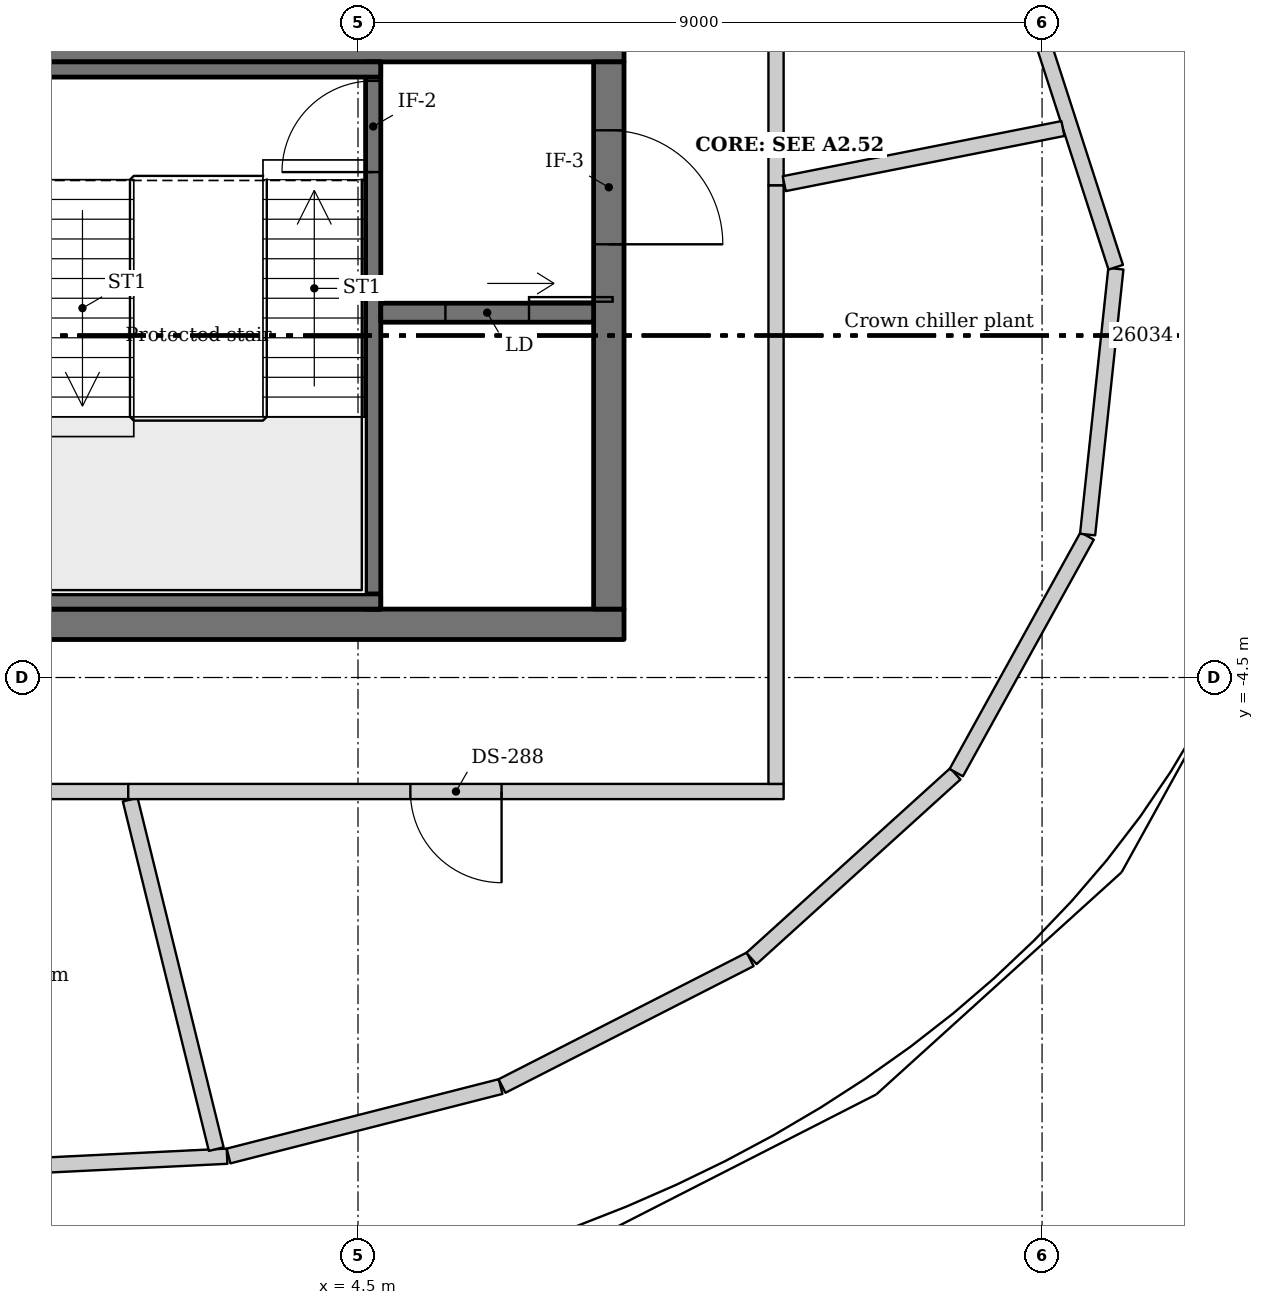
"""IFC4 building model, lengths in metres.
Left out: names, types, materials, properties, quantities, classifications, styles, units other than length and angle.
Written with IfcOpenShell. Run it as: python <this file> out.ifc"""

import sys

from ifc_helpers import new_model, si_unit, direction, frame, frame_2d, origin, place, context, subcontext, project, spatial, rectangle, extrude, source, transform, mapped, element, fill, save


model = new_model("IFC4")
c1 = context("Model", 3, precision=1e-05, world=origin(), true_north=direction((0.0, 1.0)))
c2 = subcontext(c1, "Body", "Model", "MODEL_VIEW")
j1 = project(units=[si_unit("LENGTHUNIT", "METRE"), si_unit("PLANEANGLEUNIT", "RADIAN")], contexts=[c1])
p1 = place(None, origin())
s1 = spatial("IfcSite", under=j1, at=p1, CompositionType="ELEMENT")
p2 = place(p1, origin())
s2 = spatial("IfcBuilding", under=s1, at=p2, CompositionType="ELEMENT")
p3 = place(p2, frame((0.0, 0.0, 361.0)))
s3 = spatial("IfcBuildingStorey", under=s2, at=p3, CompositionType="ELEMENT", Elevation=361.0)
m1 = source(origin(), c2, "Body", "SweptSolid", [
    extrude(rectangle(XDim=16.0, YDim=0.4, at=frame_2d((8.0, 0.0))), origin(), (0.0, 0.0, 1.0), 4.5),
])
for number, where, z_axis, x_axis in (
    (1, (-8.0, 3.8, -0.25), (0.0, 0.0, 1.0), (1.0, 0.0, 0.0)),
    (2, (-8.0, -3.8, -0.25), (0.0, 0.0, 1.0), (1.0, 0.0, 0.0)),
):
    element("IfcWall", number, at=place(p3, frame(where, z_axis=z_axis, x_axis=x_axis)), inside=s3, PredefinedType="SHEAR", context=c2, shape_type="MappedRepresentation", body=[
        mapped(m1, transform((0.0, 0.0, 0.0))),
    ])
m2 = source(origin(), c2, "Body", "SweptSolid", [
    extrude(rectangle(XDim=7.2, YDim=0.4, at=frame_2d((3.6, 0.0))), origin(), (0.0, 0.0, 1.0), 4.5),
])
p4 = place(p3, frame((7.8, -3.6, -0.25), z_axis=(0.0, 0.0, 1.0), x_axis=(0.0, 1.0, 0.0)))
e3 = element("IfcWall", 3, at=p4, inside=s3, PredefinedType="SHEAR", context=c2, shape_type="MappedRepresentation", body=[
    mapped(m2, transform((0.0, 0.0, 0.0))),
])
m3 = source(origin(), c2, "Body", "SweptSolid", [
    extrude(rectangle(XDim=1.5, YDim=2.1, at=frame_2d((0.75, 1.05))), frame((0.0, 0.21, 0.0), z_axis=(0.0, -1.0, 0.0), x_axis=(1.0, 0.0, 0.0)), (0.0, 0.0, 1.0), 0.42),
])
p5 = place(p4, frame((4.8, 0.0, 0.25)))
e4 = element("IfcOpeningElement", 4, at=p5, cuts=e3, PredefinedType="OPENING", context=c2, shape_type="MappedRepresentation", body=[
    mapped(m3, transform((0.0, 0.0, 0.0))),
])
m4 = source(origin(), c2, "Body", "SweptSolid", [
    extrude(rectangle(XDim=3.704, YDim=0.2, at=frame_2d((1.852, 0.0))), origin(), (0.0, 0.0, 1.0), 4.25),
])
p6 = place(p3, frame((2.777, -10.799, 0.0), z_axis=(0.0, 0.0, 1.0), x_axis=(-0.998800036237, -0.04897435669, 0.0)))
e5 = element("IfcWall", 5, at=p6, inside=s3, PredefinedType="SOLIDWALL", context=c2, shape_type="MappedRepresentation", body=[
    mapped(m4, transform((0.0, 0.0, 0.0))),
])
m5 = source(origin(), c2, "Body", "SweptSolid", [
    extrude(rectangle(XDim=3.694, YDim=0.2, at=frame_2d((1.847, 0.0))), origin(), (0.0, 0.0, 1.0), 4.25),
])
p7 = place(p3, frame((6.376, -9.882, 0.0), z_axis=(0.0, 0.0, 1.0), x_axis=(-0.968929170675, -0.247338355731, 0.0)))
e6 = element("IfcWall", 6, at=p7, inside=s3, PredefinedType="SOLIDWALL", context=c2, shape_type="MappedRepresentation", body=[
    mapped(m5, transform((0.0, 0.0, 0.0))),
])
m6 = source(origin(), c2, "Body", "SweptSolid", [
    extrude(rectangle(XDim=3.666, YDim=0.2, at=frame_2d((1.833, 0.0))), origin(), (0.0, 0.0, 1.0), 4.25),
])
p8 = place(p3, frame((9.66, -8.208, 0.0), z_axis=(0.0, 0.0, 1.0), x_axis=(-0.89069419258, -0.454602964469, 0.0)))
e7 = element("IfcWall", 7, at=p8, inside=s3, PredefinedType="SOLIDWALL", context=c2, shape_type="MappedRepresentation", body=[
    mapped(m6, transform((0.0, 0.0, 0.0))),
])
m7 = source(origin(), c2, "Body", "SweptSolid", [
    extrude(rectangle(XDim=3.619, YDim=0.2, at=frame_2d((1.81, 0.0))), origin(), (0.0, 0.0, 1.0), 4.25),
])
p9 = place(p3, frame((12.359, -5.767, 0.0), z_axis=(0.0, 0.0, 1.0), x_axis=(-0.741120145492, -0.671372422688, 0.0)))
e8 = element("IfcWall", 8, at=p9, inside=s3, PredefinedType="SOLIDWALL", context=c2, shape_type="MappedRepresentation", body=[
    mapped(m7, transform((0.0, 0.0, 0.0))),
])
m8 = source(origin(), c2, "Body", "SweptSolid", [
    extrude(rectangle(XDim=3.559, YDim=0.2, at=frame_2d((1.779, 0.0))), origin(), (0.0, 0.0, 1.0), 4.25),
])
p10 = place(p3, frame((14.093, -2.638, 0.0), z_axis=(0.0, 0.0, 1.0), x_axis=(-0.483958553542, -0.875090920107, 0.0)))
e9 = element("IfcWall", 9, at=p10, inside=s3, PredefinedType="SOLIDWALL", context=c2, shape_type="MappedRepresentation", body=[
    mapped(m8, transform((0.0, 0.0, 0.0))),
])
m9 = source(origin(), c2, "Body", "SweptSolid", [
    extrude(rectangle(XDim=3.518, YDim=0.2, at=frame_2d((1.759, 0.0))), origin(), (0.0, 0.0, 1.0), 4.25),
])
p11 = place(p3, frame((14.471, 0.879, 0.0), z_axis=(0.0, 0.0, 1.0), x_axis=(-0.105775833098, -0.994390000519, 0.0)))
e10 = element("IfcWall", 10, at=p11, inside=s3, PredefinedType="SOLIDWALL", context=c2, shape_type="MappedRepresentation", body=[
    mapped(m9, transform((0.0, 0.0, 0.0))),
])
m10 = source(origin(), c2, "Body", "SweptSolid", [
    extrude(rectangle(XDim=3.532, YDim=0.2, at=frame_2d((1.766, 0.0))), origin(), (0.0, 0.0, 1.0), 4.25),
])
p12 = place(p3, frame((13.383, 4.26, 0.0), z_axis=(0.0, 0.0, 1.0), x_axis=(0.307547938379, -0.951532587776, 0.0)))
e11 = element("IfcWall", 11, at=p12, inside=s3, PredefinedType="SOLIDWALL", context=c2, shape_type="MappedRepresentation", body=[
    mapped(m10, transform((0.0, 0.0, 0.0))),
])
m11 = source(origin(), c2, "Body", "SweptSolid", [
    extrude(rectangle(XDim=7.2, YDim=0.2, at=frame_2d((3.6, 0.0))), origin(), (0.0, 0.0, 1.0), 4.25),
])
p13 = place(p3, frame((4.7, -3.6, 0.0), z_axis=(0.0, 0.0, 1.0), x_axis=(0.0, 1.0, 0.0)))
e12 = element("IfcWall", 12, at=p13, inside=s3, PredefinedType="SHEAR", context=c2, shape_type="MappedRepresentation", body=[
    mapped(m11, transform((0.0, 0.0, 0.0))),
])
m12 = source(origin(), c2, "Body", "SweptSolid", [
    extrude(rectangle(XDim=1.2, YDim=2.1, at=frame_2d((0.6, 1.05))), frame((0.0, 0.11, 0.0), z_axis=(0.0, -1.0, 0.0), x_axis=(1.0, 0.0, 0.0)), (0.0, 0.0, 1.0), 0.22),
])
p14 = place(p13, frame((5.75, 0.0, 0.0)))
e13 = element("IfcOpeningElement", 13, at=p14, cuts=e12, PredefinedType="OPENING", context=c2, shape_type="MappedRepresentation", body=[
    mapped(m12, transform((0.0, 0.0, 0.0))),
])
m13 = source(origin(), c2, "Body", "SweptSolid", [
    extrude(rectangle(XDim=2.8, YDim=0.25, at=frame_2d((1.4, 0.0))), origin(), (0.0, 0.0, 1.0), 4.25),
])
p15 = place(p3, frame((7.6, 0.3, 0.0), z_axis=(0.0, 0.0, 1.0), x_axis=(-1.0, 0.0, 0.0)))
e14 = element("IfcWall", 14, at=p15, inside=s3, PredefinedType="SHEAR", context=c2, shape_type="MappedRepresentation", body=[
    mapped(m13, transform((0.0, 0.0, 0.0))),
])
m14 = source(origin(), c2, "Body", "SweptSolid", [
    extrude(rectangle(XDim=1.1, YDim=2.1, at=frame_2d((0.55, 1.05))), frame((0.0, 0.135, 0.0), z_axis=(0.0, -1.0, 0.0), x_axis=(1.0, 0.0, 0.0)), (0.0, 0.0, 1.0), 0.27),
])
p16 = place(p15, frame((0.85, 0.0, 0.0)))
e15 = element("IfcOpeningElement", 15, at=p16, cuts=e14, PredefinedType="OPENING", context=c2, shape_type="MappedRepresentation", body=[
    mapped(m14, transform((0.0, 0.0, 0.0))),
])
m15 = source(origin(), c2, "Body", "SweptSolid", [
    extrude(rectangle(XDim=9.596, YDim=0.2, at=frame_2d((4.798, 0.0))), origin(), (0.0, 0.0, 1.0), 4.25),
])
for number, where, z_axis, x_axis in (
    (16, (-4.798, -3.5, 0.0), (0.0, 0.0, 1.0), (1.0, 0.0, 0.0)),
    (17, (4.798, 3.5, 0.0), (0.0, 0.0, 1.0), (-1.0, 0.0, 0.0)),
):
    element("IfcWall", number, at=place(p3, frame(where, z_axis=z_axis, x_axis=x_axis)), inside=s3, PredefinedType="SHEAR", context=c2, shape_type="MappedRepresentation", body=[
        mapped(m15, transform((0.0, 0.0, 0.0))),
    ])
m16 = source(origin(), c2, "Body", "SweptSolid", [
    extrude(rectangle(XDim=11.577, YDim=0.2, at=frame_2d((5.789, 0.0))), origin(), (0.0, 0.0, 1.0), 4.25),
])
p17 = place(p3, frame((1.477, -6.0, 0.0), z_axis=(0.0, 0.0, 1.0), x_axis=(-1.0, 0.0, 0.0)))
e18 = element("IfcWall", 18, at=p17, inside=s3, PredefinedType="PARTITIONING", context=c2, shape_type="MappedRepresentation", body=[
    mapped(m16, transform((0.0, 0.0, 0.0))),
])
p18 = place(p17, frame((5.189, 0.0, 0.0)))
e19 = element("IfcOpeningElement", 19, at=p18, cuts=e18, PredefinedType="OPENING", context=c2, shape_type="MappedRepresentation", body=[
    mapped(m12, transform((0.0, 0.0, 0.0))),
])
m17 = source(origin(), c2, "Body", "SweptSolid", [
    extrude(rectangle(XDim=4.735, YDim=0.2, at=frame_2d((2.368, 0.0))), origin(), (0.0, 0.0, 1.0), 4.25),
])
p19 = place(p3, frame((1.503, -6.107, 0.0), z_axis=(0.0, 0.0, 1.0), x_axis=(0.239064665941, -0.971003648551, 0.0)))
e20 = element("IfcWall", 20, at=p19, inside=s3, PredefinedType="PARTITIONING", context=c2, shape_type="MappedRepresentation", body=[
    mapped(m17, transform((0.0, 0.0, 0.0))),
])
m18 = source(origin(), c2, "Body", "SweptSolid", [
    extrude(rectangle(XDim=8.623, YDim=0.2, at=frame_2d((4.312, 0.0))), origin(), (0.0, 0.0, 1.0), 4.25),
])
p20 = place(p3, frame((10.1, -6.0, 0.0), z_axis=(0.0, 0.0, 1.0), x_axis=(-1.0, 0.0, 0.0)))
e21 = element("IfcWall", 21, at=p20, inside=s3, PredefinedType="PARTITIONING", context=c2, shape_type="MappedRepresentation", body=[
    mapped(m18, transform((0.0, 0.0, 0.0))),
])
p21 = place(p20, frame((3.711, 0.0, 0.0)))
e22 = element("IfcOpeningElement", 22, at=p21, cuts=e21, PredefinedType="OPENING", context=c2, shape_type="MappedRepresentation", body=[
    mapped(m12, transform((0.0, 0.0, 0.0))),
])
m19 = source(origin(), c2, "Body", "SweptSolid", [
    extrude(rectangle(XDim=7.877, YDim=0.2, at=frame_2d((3.938, 0.0))), origin(), (0.0, 0.0, 1.0), 4.25),
])
p22 = place(p3, frame((10.0, 1.977, 0.0), z_axis=(0.0, 0.0, 1.0), x_axis=(0.0, -1.0, 0.0)))
e23 = element("IfcWall", 23, at=p22, inside=s3, PredefinedType="PARTITIONING", context=c2, shape_type="MappedRepresentation", body=[
    mapped(m19, transform((0.0, 0.0, 0.0))),
])
m20 = source(origin(), c2, "Body", "SweptSolid", [
    extrude(rectangle(XDim=3.923, YDim=0.2, at=frame_2d((1.961, 0.0))), origin(), (0.0, 0.0, 1.0), 4.25),
])
p23 = place(p3, frame((10.0, 5.9, 0.0), z_axis=(0.0, 0.0, 1.0), x_axis=(0.0, -1.0, 0.0)))
e24 = element("IfcWall", 24, at=p23, inside=s3, PredefinedType="PARTITIONING", context=c2, shape_type="MappedRepresentation", body=[
    mapped(m20, transform((0.0, 0.0, 0.0))),
])
m21 = source(origin(), c2, "Body", "SweptSolid", [
    extrude(rectangle(XDim=3.737, YDim=0.2, at=frame_2d((1.869, 0.0))), origin(), (0.0, 0.0, 1.0), 4.25),
])
p24 = place(p3, frame((13.774, 2.723, 0.0), z_axis=(0.0, 0.0, 1.0), x_axis=(-0.981007998173, -0.193967284668, 0.0)))
e25 = element("IfcWall", 25, at=p24, inside=s3, PredefinedType="PARTITIONING", context=c2, shape_type="MappedRepresentation", body=[
    mapped(m21, transform((0.0, 0.0, 0.0))),
])
m22 = source(origin(), c2, "Body", "SweptSolid", [
    extrude(rectangle(XDim=1.1, YDim=2.1, at=frame_2d((0.55, 1.05))), frame((0.0, 0.025, 0.0), z_axis=(0.0, -1.0, 0.0), x_axis=(1.0, 0.0, 0.0)), (0.0, 0.0, 1.0), 0.05),
])
p25 = place(p16, origin())
e26 = element("IfcDoor", 26, at=p25, inside=s3, OperationType="SLIDING_TO_LEFT", PredefinedType="DOOR", context=c2, shape_type="MappedRepresentation", body=[
    mapped(m22, transform((0.0, 0.0, 0.0))),
])
fill(e15, e26)
m23 = source(origin(), c2, "Body", "SweptSolid", [
    extrude(rectangle(XDim=1.2, YDim=2.1, at=frame_2d((0.6, 1.05))), frame((0.0, 0.025, 0.0), z_axis=(0.0, -1.0, 0.0), x_axis=(1.0, 0.0, 0.0)), (0.0, 0.0, 1.0), 0.05),
])
p26 = place(p14, origin())
e27 = element("IfcDoor", 27, at=p26, inside=s3, OperationType="SINGLE_SWING_LEFT", PredefinedType="DOOR", context=c2, shape_type="MappedRepresentation", body=[
    mapped(m23, transform((0.0, 0.0, 0.0))),
])
fill(e13, e27)
m24 = source(origin(), c2, "Body", "SweptSolid", [
    extrude(rectangle(XDim=1.5, YDim=2.1, at=frame_2d((0.75, 1.05))), frame((0.0, 0.025, 0.0), z_axis=(0.0, -1.0, 0.0), x_axis=(1.0, 0.0, 0.0)), (0.0, 0.0, 1.0), 0.05),
])
p27 = place(p5, origin())
e28 = element("IfcDoor", 28, at=p27, inside=s3, OperationType="DOUBLE_DOOR_SINGLE_SWING", PredefinedType="DOOR", context=c2, shape_type="MappedRepresentation", body=[
    mapped(m24, transform((0.0, 0.0, 0.0))),
])
fill(e4, e28)
m25 = source(origin(), c2, "Body", "SweptSolid", [
    extrude(rectangle(XDim=1.2, YDim=2.1, at=frame_2d((0.6, 1.05))), frame((0.0, 0.025, 0.0), z_axis=(0.0, -1.0, 0.0), x_axis=(1.0, 0.0, 0.0)), (0.0, 0.0, 1.0), 0.05),
])
p28 = place(p21, origin())
e29 = element("IfcDoor", 29, at=p28, inside=s3, OperationType="SINGLE_SWING_LEFT", PredefinedType="DOOR", context=c2, shape_type="MappedRepresentation", body=[
    mapped(m25, transform((0.0, 0.0, 0.0))),
])
fill(e22, e29)
save(model, sys.argv[1])
